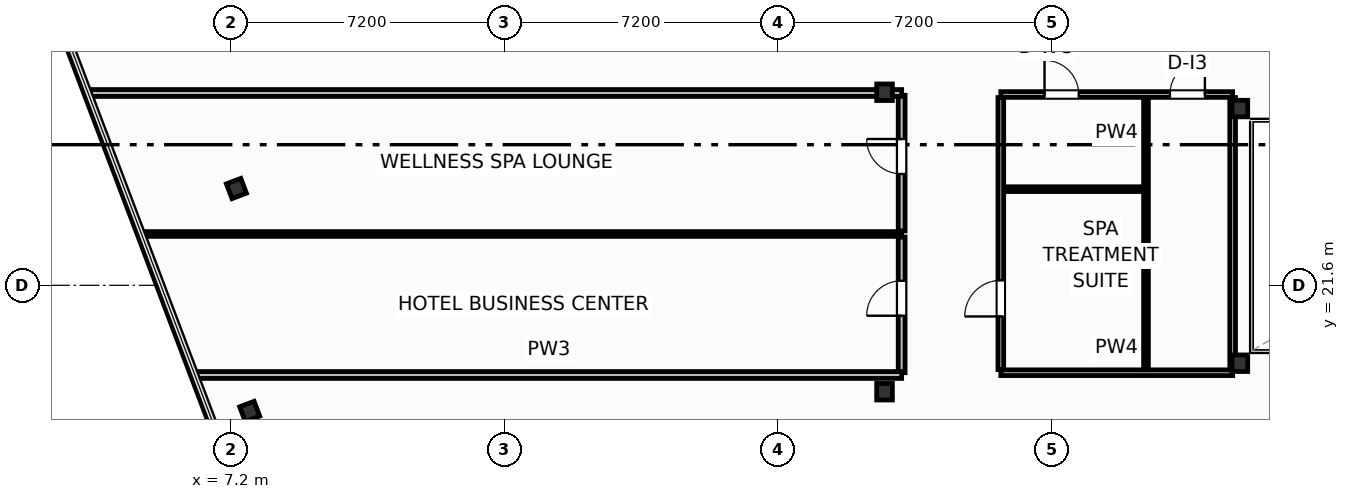
"""IFC4 building model, lengths in metres.
Left out: names, types, materials, properties, quantities, classifications, styles, units other than length and angle.
Written with IfcOpenShell. Run it as: python <this file> out.ifc"""

import sys

from ifc_helpers import new_model, si_unit, direction, frame, frame_2d, origin, origin_2d, place, context, subcontext, project, spatial, rectangle, i_section, extrude, element, fill, save


model = new_model("IFC4")
c1 = context("Model", 3, precision=1e-05, world=origin(), true_north=direction((0.0, 1.0)))
c2 = subcontext(c1, "Body", "Model", "MODEL_VIEW")
j1 = project(units=[si_unit("LENGTHUNIT", "METRE"), si_unit("PLANEANGLEUNIT", "RADIAN")], contexts=[c1])
p1 = place(None, origin())
s1 = spatial("IfcSite", under=j1, at=p1, CompositionType="ELEMENT")
p2 = place(p1, origin())
s2 = spatial("IfcBuilding", under=s1, at=p2, CompositionType="ELEMENT")
p3 = place(p2, frame((0.0, 0.0, 242.3)))
s3 = spatial("IfcBuildingStorey", under=s2, at=p3, CompositionType="ELEMENT", Elevation=242.3)
for number, where, z_axis, x_axis in (
    (1, (33.75, 19.55, 0.0), (0.0, 0.0, 1.0), (1.0, 0.0, 0.0)),
    (2, (33.75, 26.25, 0.0), (0.0, 0.0, 1.0), (1.0, 0.0, 0.0)),
    (3, (24.4, 18.8, 0.0), (0.0, 0.0, 1.0), (1.0, 0.0, 0.0)),
    (4, (24.4, 26.68, 0.0), (0.0, 0.0, 1.0), (1.0, 0.0, 0.0)),
):
    element("IfcColumn", number, at=place(p3, frame(where, z_axis=z_axis, x_axis=x_axis)), inside=s3, PredefinedType="COLUMN", context=c2, shape_type="SweptSolid", body=[
        extrude(i_section(OverallWidth=0.412, OverallDepth=0.435, WebThickness=0.036, FlangeThickness=0.057, FilletRadius=0.025, at=origin_2d()), origin(), (0.0, 0.0, 1.0), 3.7),
    ])
for number, where, z_axis, x_axis in (
    (5, (7.345, 24.146, 0.0), (0.0, 0.0, 1.0), (0.935, 0.354, 0.0)),
    (6, (7.695, 18.281, 0.0), (0.0, 0.0, 1.0), (0.935, 0.354, 0.0)),
):
    element("IfcColumn", number, at=place(p3, frame(where, z_axis=z_axis, x_axis=x_axis)), inside=s3, PredefinedType="COLUMN", context=c2, shape_type="SweptSolid", body=[
        extrude(i_section(OverallWidth=0.406, OverallDepth=0.416, WebThickness=0.03, FlangeThickness=0.048, FilletRadius=0.025, at=origin_2d()), origin(), (0.0, 0.0, 1.0), 3.7),
    ])
p4 = place(p3, frame((24.85, 19.3, 0.0), z_axis=(0.0, 0.0, 1.0), x_axis=(0.0, 1.0, 0.0)))
e7 = element("IfcWall", 7, at=p4, inside=s3, PredefinedType="PARTITIONING", context=c2, shape_type="SweptSolid", body=[
    extrude(rectangle(XDim=3.57, YDim=0.18, at=frame_2d((1.785, 0.0))), origin(), (0.0, 0.0, 1.0), 3.45),
])
p5 = place(p4, frame((1.5, 0.0, 0.0)))
e8 = element("IfcOpeningElement", 8, at=p5, cuts=e7, PredefinedType="OPENING", context=c2, shape_type="SweptSolid", body=[
    extrude(rectangle(XDim=0.92, YDim=2.05, at=frame_2d((0.46, 1.025))), frame((0.0, 0.1, 0.0), z_axis=(0.0, -1.0, 0.0), x_axis=(1.0, 0.0, 0.0)), (0.0, 0.0, 1.0), 0.2),
])
p6 = place(p3, frame((24.85, 23.03, 0.0), z_axis=(0.0, 0.0, 1.0), x_axis=(0.0, 1.0, 0.0)))
e9 = element("IfcWall", 9, at=p6, inside=s3, PredefinedType="PARTITIONING", context=c2, shape_type="SweptSolid", body=[
    extrude(rectangle(XDim=3.57, YDim=0.18, at=frame_2d((1.785, 0.0))), origin(), (0.0, 0.0, 1.0), 3.45),
])
p7 = place(p6, frame((1.5, 0.0, 0.0)))
e10 = element("IfcOpeningElement", 10, at=p7, cuts=e9, PredefinedType="OPENING", context=c2, shape_type="SweptSolid", body=[
    extrude(rectangle(XDim=0.92, YDim=2.05, at=frame_2d((0.46, 1.025))), frame((0.0, 0.1, 0.0), z_axis=(0.0, -1.0, 0.0), x_axis=(1.0, 0.0, 0.0)), (0.0, 0.0, 1.0), 0.2),
])
p8 = place(p3, frame((4.887, 22.95, 0.0), z_axis=(0.0, 0.0, 1.0), x_axis=(1.0, 0.0, 0.0)))
e11 = element("IfcWall", 11, at=p8, inside=s3, PredefinedType="PARTITIONING", context=c2, shape_type="SweptSolid", body=[
    extrude(rectangle(XDim=19.963, YDim=0.125, at=frame_2d((9.982, 0.0))), origin(), (0.0, 0.0, 1.0), 3.45),
])
p9 = place(p3, frame((6.291, 19.24, 0.0), z_axis=(0.0, 0.0, 1.0), x_axis=(1.0, 0.0, 0.0)))
e12 = element("IfcWall", 12, at=p9, inside=s3, PredefinedType="PARTITIONING", context=c2, shape_type="SweptSolid", body=[
    extrude(rectangle(XDim=18.559, YDim=0.18, at=frame_2d((9.279, 0.0))), origin(), (0.0, 0.0, 1.0), 3.45),
])
p10 = place(p3, frame((3.482, 26.66, 0.0), z_axis=(0.0, 0.0, 1.0), x_axis=(1.0, 0.0, 0.0)))
e13 = element("IfcWall", 13, at=p10, inside=s3, PredefinedType="PARTITIONING", context=c2, shape_type="SweptSolid", body=[
    extrude(rectangle(XDim=21.368, YDim=0.18, at=frame_2d((10.684, 0.0))), origin(), (0.0, 0.0, 1.0), 2.662),
])
p11 = place(p3, frame((27.46, 19.3, 0.0), z_axis=(0.0, 0.0, 1.0), x_axis=(1.0, 0.0, 0.0)))
e14 = element("IfcWall", 14, at=p11, inside=s3, PredefinedType="PARTITIONING", context=c2, shape_type="SweptSolid", body=[
    extrude(rectangle(XDim=6.1, YDim=0.15, at=frame_2d((3.05, 0.0))), origin(), (0.0, 0.0, 1.0), 2.662),
])
p12 = place(p3, frame((27.46, 26.62, 0.0), z_axis=(0.0, 0.0, 1.0), x_axis=(1.0, 0.0, 0.0)))
e15 = element("IfcWall", 15, at=p12, inside=s3, PredefinedType="PARTITIONING", context=c2, shape_type="SweptSolid", body=[
    extrude(rectangle(XDim=6.1, YDim=0.15, at=frame_2d((3.05, 0.0))), origin(), (0.0, 0.0, 1.0), 2.662),
])
p13 = place(p12, frame((1.15, 0.0, 0.0)))
e16 = element("IfcOpeningElement", 16, at=p13, cuts=e15, PredefinedType="OPENING", context=c2, shape_type="SweptSolid", body=[
    extrude(rectangle(XDim=0.9, YDim=2.05, at=frame_2d((0.45, 1.025))), frame((0.0, 0.085, 0.0), z_axis=(0.0, -1.0, 0.0), x_axis=(1.0, 0.0, 0.0)), (0.0, 0.0, 1.0), 0.17),
])
p14 = place(p12, frame((4.45, 0.0, 0.0)))
e17 = element("IfcOpeningElement", 17, at=p14, cuts=e15, PredefinedType="OPENING", context=c2, shape_type="SweptSolid", body=[
    extrude(rectangle(XDim=0.92, YDim=2.05, at=frame_2d((0.46, 1.025))), frame((0.0, 0.085, 0.0), z_axis=(0.0, -1.0, 0.0), x_axis=(1.0, 0.0, 0.0)), (0.0, 0.0, 1.0), 0.17),
])
p15 = place(p3, frame((31.28, 19.38, 0.0), z_axis=(0.0, 0.0, 1.0), x_axis=(0.0, 1.0, 0.0)))
e18 = element("IfcWall", 18, at=p15, inside=s3, PredefinedType="PARTITIONING", context=c2, shape_type="SweptSolid", body=[
    extrude(rectangle(XDim=7.16, YDim=0.125, at=frame_2d((3.58, 0.0))), origin(), (0.0, 0.0, 1.0), 3.45),
])
p16 = place(p3, frame((27.52, 24.13, 0.0), z_axis=(0.0, 0.0, 1.0), x_axis=(1.0, 0.0, 0.0)))
e19 = element("IfcWall", 19, at=p16, inside=s3, PredefinedType="PARTITIONING", context=c2, shape_type="SweptSolid", body=[
    extrude(rectangle(XDim=3.7, YDim=0.125, at=frame_2d((1.85, 0.0))), origin(), (0.0, 0.0, 1.0), 3.45),
])
p17 = place(p3, frame((27.46, 19.38, 0.0), z_axis=(0.0, 0.0, 1.0), x_axis=(0.0, 1.0, 0.0)))
e20 = element("IfcWall", 20, at=p17, inside=s3, PredefinedType="PARTITIONING", context=c2, shape_type="SweptSolid", body=[
    extrude(rectangle(XDim=7.16, YDim=0.15, at=frame_2d((3.58, 0.0))), origin(), (0.0, 0.0, 1.0), 3.45),
])
p18 = place(p17, frame((1.4, 0.0, 0.0)))
e21 = element("IfcOpeningElement", 21, at=p18, cuts=e20, PredefinedType="OPENING", context=c2, shape_type="SweptSolid", body=[
    extrude(rectangle(XDim=0.95, YDim=2.05, at=frame_2d((0.475, 1.025))), frame((0.0, 0.085, 0.0), z_axis=(0.0, -1.0, 0.0), x_axis=(1.0, 0.0, 0.0)), (0.0, 0.0, 1.0), 0.17),
])
p19 = place(p3, frame((33.56, 19.38, 0.0), z_axis=(0.0, 0.0, 1.0), x_axis=(0.0, 1.0, 0.0)))
e22 = element("IfcWall", 22, at=p19, inside=s3, PredefinedType="PARTITIONING", context=c2, shape_type="SweptSolid", body=[
    extrude(rectangle(XDim=7.16, YDim=0.15, at=frame_2d((3.58, 0.0))), origin(), (0.0, 0.0, 1.0), 2.824),
])
p20 = place(p5, origin())
e23 = element("IfcDoor", 23, at=p20, inside=s3, OperationType="SINGLE_SWING_LEFT", PredefinedType="DOOR", context=c2, shape_type="SweptSolid", body=[
    extrude(rectangle(XDim=0.92, YDim=2.05, at=frame_2d((0.46, 1.025))), frame((0.0, 0.025, 0.0), z_axis=(0.0, -1.0, 0.0), x_axis=(1.0, 0.0, 0.0)), (0.0, 0.0, 1.0), 0.05),
])
fill(e8, e23)
p21 = place(p7, origin())
e24 = element("IfcDoor", 24, at=p21, inside=s3, OperationType="SINGLE_SWING_RIGHT", PredefinedType="DOOR", context=c2, shape_type="SweptSolid", body=[
    extrude(rectangle(XDim=0.92, YDim=2.05, at=frame_2d((0.46, 1.025))), frame((0.0, 0.025, 0.0), z_axis=(0.0, -1.0, 0.0), x_axis=(1.0, 0.0, 0.0)), (0.0, 0.0, 1.0), 0.05),
])
fill(e10, e24)
p22 = place(p13, origin())
e25 = element("IfcDoor", 25, at=p22, inside=s3, OperationType="SINGLE_SWING_LEFT", PredefinedType="DOOR", context=c2, shape_type="SweptSolid", body=[
    extrude(rectangle(XDim=0.9, YDim=2.05, at=frame_2d((0.45, 1.025))), frame((0.0, 0.025, 0.0), z_axis=(0.0, -1.0, 0.0), x_axis=(1.0, 0.0, 0.0)), (0.0, 0.0, 1.0), 0.05),
])
fill(e16, e25)
p23 = place(p14, origin())
e26 = element("IfcDoor", 26, at=p23, inside=s3, OperationType="SINGLE_SWING_RIGHT", PredefinedType="DOOR", context=c2, shape_type="SweptSolid", body=[
    extrude(rectangle(XDim=0.92, YDim=2.05, at=frame_2d((0.46, 1.025))), frame((0.0, 0.025, 0.0), z_axis=(0.0, -1.0, 0.0), x_axis=(1.0, 0.0, 0.0)), (0.0, 0.0, 1.0), 0.05),
])
fill(e17, e26)
p24 = place(p18, origin())
e27 = element("IfcDoor", 27, at=p24, inside=s3, OperationType="SINGLE_SWING_LEFT", PredefinedType="DOOR", context=c2, shape_type="SweptSolid", body=[
    extrude(rectangle(XDim=0.95, YDim=2.05, at=frame_2d((0.475, 1.025))), frame((0.0, 0.025, 0.0), z_axis=(0.0, -1.0, 0.0), x_axis=(1.0, 0.0, 0.0)), (0.0, 0.0, 1.0), 0.05),
])
fill(e21, e27)
save(model, sys.argv[1])
